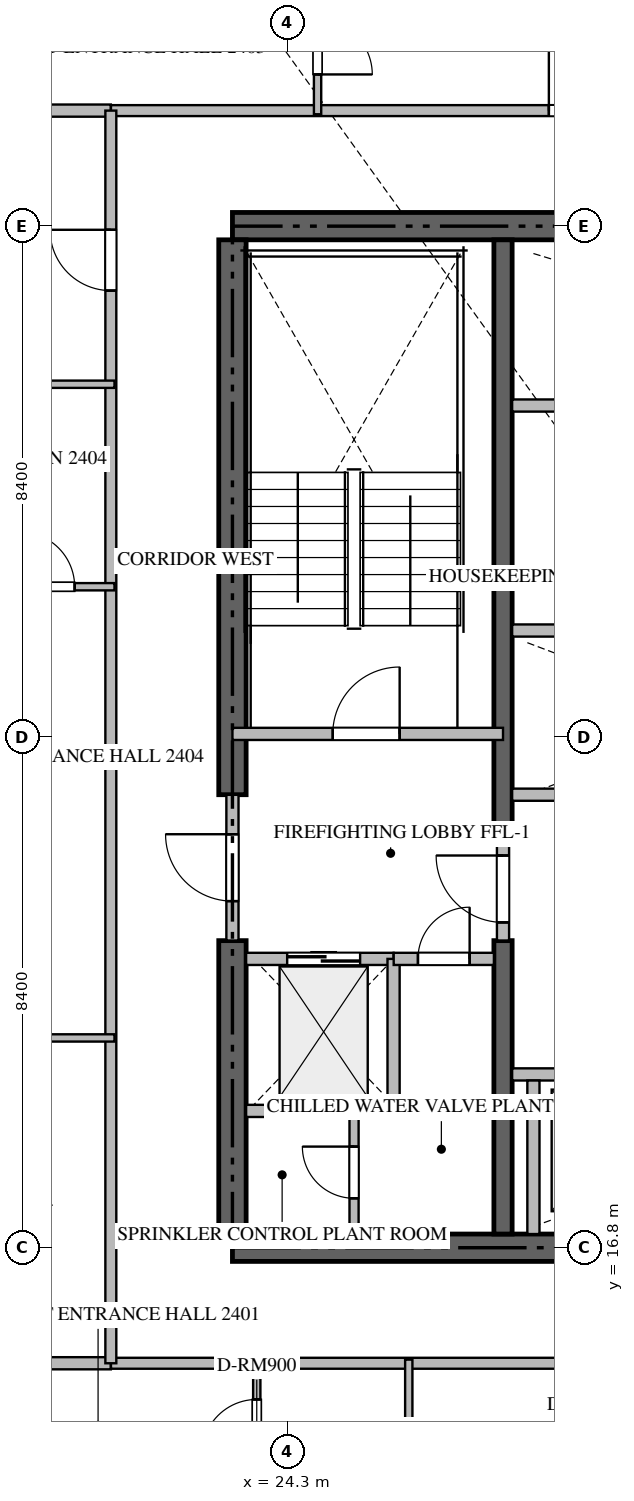
"""IFC4 building model, lengths in metres.
Left out: names, types, materials, properties, quantities, classifications, styles, units other than length and angle.
Written with IfcOpenShell. Run it as: python <this file> out.ifc"""

import sys

from ifc_helpers import new_model, si_unit, direction, frame, frame_2d, origin, place, context, subcontext, project, spatial, rectangle, extrude, source, transform, mapped, element, fill, save


model = new_model("IFC4")
c1 = context("Model", 3, precision=1e-05, world=origin(), true_north=direction((0.0, 1.0)))
c2 = subcontext(c1, "Body", "Model", "MODEL_VIEW")
j1 = project(units=[si_unit("LENGTHUNIT", "METRE"), si_unit("PLANEANGLEUNIT", "RADIAN")], contexts=[c1])
p1 = place(None, origin())
s1 = spatial("IfcSite", under=j1, at=p1, CompositionType="ELEMENT")
p2 = place(p1, origin())
s2 = spatial("IfcBuilding", under=s1, at=p2, CompositionType="ELEMENT")
p3 = place(p2, frame((0.0, 0.0, 97.95)))
s3 = spatial("IfcBuildingStorey", under=s2, at=p3, CompositionType="ELEMENT", Elevation=97.95)
for number, where, z_axis, x_axis in (
    (1, (23.4, 16.8, -0.26), (0.0, 0.0, 1.0), (1.0, 0.0, 0.0)),
    (2, (41.4, 33.6, -0.26), (0.0, 0.0, 1.0), (-1.0, 0.0, 0.0)),
):
    element("IfcWall", number, at=place(p3, frame(where, z_axis=z_axis, x_axis=x_axis)), inside=s3, PredefinedType="SHEAR", context=c2, shape_type="SweptSolid", body=[
        extrude(rectangle(XDim=18.0, YDim=0.45, at=frame_2d((9.0, 0.0))), origin(), (0.0, 0.0, 1.0), 3.748),
    ])
p4 = place(p3, frame((23.4, 17.025, -0.26), z_axis=(0.0, 0.0, 1.0), x_axis=(0.0, 1.0, 0.0)))
e3 = element("IfcWall", 3, at=p4, inside=s3, PredefinedType="SHEAR", context=c2, shape_type="SweptSolid", body=[
    extrude(rectangle(XDim=4.825, YDim=0.45, at=frame_2d((2.413, 0.0))), origin(), (0.0, 0.0, 1.0), 3.748),
])
p5 = place(p3, frame((23.4, 24.25, -0.26), z_axis=(0.0, 0.0, 1.0), x_axis=(0.0, 1.0, 0.0)))
e4 = element("IfcWall", 4, at=p5, inside=s3, PredefinedType="SHEAR", context=c2, shape_type="SweptSolid", body=[
    extrude(rectangle(XDim=9.125, YDim=0.45, at=frame_2d((4.562, 0.0))), origin(), (0.0, 0.0, 1.0), 3.748),
])
p6 = place(p3, frame((27.85, 17.025, -0.26), z_axis=(0.0, 0.0, 1.0), x_axis=(0.0, 1.0, 0.0)))
e5 = element("IfcWall", 5, at=p6, inside=s3, PredefinedType="SHEAR", context=c2, shape_type="SweptSolid", body=[
    extrude(rectangle(XDim=4.825, YDim=0.3, at=frame_2d((2.413, 0.0))), origin(), (0.0, 0.0, 1.0), 3.748),
])
p7 = place(p3, frame((27.85, 23.55, -0.26), z_axis=(0.0, 0.0, 1.0), x_axis=(0.0, 1.0, 0.0)))
e6 = element("IfcWall", 6, at=p7, inside=s3, PredefinedType="SHEAR", context=c2, shape_type="SweptSolid", body=[
    extrude(rectangle(XDim=9.825, YDim=0.3, at=frame_2d((4.913, 0.0))), origin(), (0.0, 0.0, 1.0), 3.748),
])
p8 = place(p3, frame((23.4, 25.25, 0.0), z_axis=(0.0, 0.0, 1.0), x_axis=(1.0, 0.0, 0.0)))
e7 = element("IfcWall", 7, at=p8, inside=s3, PredefinedType="STANDARD", context=c2, shape_type="SweptSolid", body=[
    extrude(rectangle(XDim=4.45, YDim=0.2, at=frame_2d((2.225, 0.0))), origin(), (0.0, 0.0, 1.0), 3.49),
])
p9 = place(p8, frame((1.65, 0.0, 0.0)))
e8 = element("IfcOpeningElement", 8, at=p9, cuts=e7, PredefinedType="OPENING", context=c2, shape_type="SweptSolid", body=[
    extrude(rectangle(XDim=1.1, YDim=2.15, at=frame_2d((0.55, 1.075))), frame((0.0, 0.11, 0.0), z_axis=(0.0, -1.0, 0.0), x_axis=(1.0, 0.0, 0.0)), (0.0, 0.0, 1.0), 0.22),
])
p10 = place(p3, frame((23.625, 21.55, 0.0), z_axis=(0.0, 0.0, 1.0), x_axis=(1.0, 0.0, 0.0)))
e9 = element("IfcWall", 9, at=p10, inside=s3, PredefinedType="STANDARD", context=c2, shape_type="SweptSolid", body=[
    extrude(rectangle(XDim=2.425, YDim=0.2, at=frame_2d((1.212, 0.0))), origin(), (0.0, 0.0, 1.0), 3.49),
])
p11 = place(p10, frame((0.675, 0.0, 0.0)))
e10 = element("IfcOpeningElement", 10, at=p11, cuts=e9, PredefinedType="OPENING", context=c2, shape_type="SweptSolid", body=[
    extrude(rectangle(XDim=1.2, YDim=2.2, at=frame_2d((0.6, 1.1))), frame((0.0, 0.11, 0.0), z_axis=(0.0, -1.0, 0.0), x_axis=(1.0, 0.0, 0.0)), (0.0, 0.0, 1.0), 0.22),
])
p12 = place(p3, frame((28.0, 19.65, 0.0), z_axis=(0.0, 0.0, 1.0), x_axis=(1.0, 0.0, 0.0)))
e11 = element("IfcWall", 11, at=p12, inside=s3, PredefinedType="STANDARD", context=c2, shape_type="SweptSolid", body=[
    extrude(rectangle(XDim=2.65, YDim=0.2, at=frame_2d((1.325, 0.0))), origin(), (0.0, 0.0, 1.0), 3.49),
])
p13 = place(p12, frame((0.9, 0.0, 0.0)))
e12 = element("IfcOpeningElement", 12, at=p13, cuts=e11, PredefinedType="OPENING", context=c2, shape_type="SweptSolid", body=[
    extrude(rectangle(XDim=1.1, YDim=2.2, at=frame_2d((0.55, 1.1))), frame((0.0, 0.11, 0.0), z_axis=(0.0, -1.0, 0.0), x_axis=(1.0, 0.0, 0.0)), (0.0, 0.0, 1.0), 0.22),
])
p14 = place(p3, frame((28.35, 17.025, 0.0), z_axis=(0.0, 0.0, 1.0), x_axis=(0.0, 1.0, 0.0)))
e13 = element("IfcWall", 13, at=p14, inside=s3, PredefinedType="STANDARD", context=c2, shape_type="SweptSolid", body=[
    extrude(rectangle(XDim=2.525, YDim=0.2, at=frame_2d((1.263, 0.0))), origin(), (0.0, 0.0, 1.0), 3.49),
])
p15 = place(p3, frame((28.0, 24.25, 0.0), z_axis=(0.0, 0.0, 1.0), x_axis=(1.0, 0.0, 0.0)))
e14 = element("IfcWall", 14, at=p15, inside=s3, PredefinedType="STANDARD", context=c2, shape_type="SweptSolid", body=[
    extrude(rectangle(XDim=2.425, YDim=0.2, at=frame_2d((1.212, 0.0))), origin(), (0.0, 0.0, 1.0), 3.49),
])
p16 = place(p3, frame((28.0, 30.65, 0.0), z_axis=(0.0, 0.0, 1.0), x_axis=(1.0, 0.0, 0.0)))
e15 = element("IfcWall", 15, at=p16, inside=s3, PredefinedType="STANDARD", context=c2, shape_type="SweptSolid", body=[
    extrude(rectangle(XDim=2.55, YDim=0.2, at=frame_2d((1.275, 0.0))), origin(), (0.0, 0.0, 1.0), 3.49),
])
p17 = place(p3, frame((26.05, 19.05, 0.0), z_axis=(0.0, 0.0, 1.0), x_axis=(0.0, 1.0, 0.0)))
e16 = element("IfcWall", 16, at=p17, inside=s3, PredefinedType="STANDARD", context=c2, shape_type="SweptSolid", body=[
    extrude(rectangle(XDim=2.5, YDim=0.2, at=frame_2d((1.25, 0.0))), origin(), (0.0, 0.0, 1.0), 3.49),
])
p18 = place(p3, frame((23.625, 19.05, 0.0), z_axis=(0.0, 0.0, 1.0), x_axis=(1.0, 0.0, 0.0)))
e17 = element("IfcWall", 17, at=p18, inside=s3, PredefinedType="STANDARD", context=c2, shape_type="SweptSolid", body=[
    extrude(rectangle(XDim=2.425, YDim=0.2, at=frame_2d((1.212, 0.0))), origin(), (0.0, 0.0, 1.0), 3.49),
])
p19 = place(p3, frame((26.052, 21.55, 0.0), z_axis=(0.0, 0.0, 1.0), x_axis=(1.0, 0.0, 0.0)))
e18 = element("IfcWall", 18, at=p19, inside=s3, PredefinedType="STANDARD", context=c2, shape_type="SweptSolid", body=[
    extrude(rectangle(XDim=1.648, YDim=0.2, at=frame_2d((0.824, 0.0))), origin(), (0.0, 0.0, 1.0), 3.49),
])
p20 = place(p19, frame((0.399, 0.0, 0.0)))
e19 = element("IfcOpeningElement", 19, at=p20, cuts=e18, PredefinedType="OPENING", context=c2, shape_type="SweptSolid", body=[
    extrude(rectangle(XDim=0.85, YDim=2.1, at=frame_2d((0.425, 1.05))), frame((0.0, 0.11, 0.0), z_axis=(0.0, -1.0, 0.0), x_axis=(1.0, 0.0, 0.0)), (0.0, 0.0, 1.0), 0.22),
])
p21 = place(p3, frame((23.4, 21.852, 0.0), z_axis=(0.0, 0.0, 1.0), x_axis=(0.0, 1.0, 0.0)))
e20 = element("IfcWall", 20, at=p21, inside=s3, PredefinedType="STANDARD", context=c2, shape_type="SweptSolid", body=[
    extrude(rectangle(XDim=2.396, YDim=0.2, at=frame_2d((1.198, 0.0))), origin(), (0.0, 0.0, 1.0), 3.49),
])
p22 = place(p21, frame((0.648, 0.0, 0.0)))
e21 = element("IfcOpeningElement", 21, at=p22, cuts=e20, PredefinedType="OPENING", context=c2, shape_type="SweptSolid", body=[
    extrude(rectangle(XDim=1.1, YDim=2.15, at=frame_2d((0.55, 1.075))), frame((0.0, 0.11, 0.0), z_axis=(0.0, -1.0, 0.0), x_axis=(1.0, 0.0, 0.0)), (0.0, 0.0, 1.0), 0.22),
])
p23 = place(p3, frame((27.85, 21.852, 0.0), z_axis=(0.0, 0.0, 1.0), x_axis=(0.0, 1.0, 0.0)))
e22 = element("IfcWall", 22, at=p23, inside=s3, PredefinedType="STANDARD", context=c2, shape_type="SweptSolid", body=[
    extrude(rectangle(XDim=1.696, YDim=0.2, at=frame_2d((0.848, 0.0))), origin(), (0.0, 0.0, 1.0), 3.49),
])
p24 = place(p23, frame((0.298, 0.0, 0.0)))
e23 = element("IfcOpeningElement", 23, at=p24, cuts=e22, PredefinedType="OPENING", context=c2, shape_type="SweptSolid", body=[
    extrude(rectangle(XDim=1.1, YDim=2.15, at=frame_2d((0.55, 1.075))), frame((0.0, 0.11, 0.0), z_axis=(0.0, -1.0, 0.0), x_axis=(1.0, 0.0, 0.0)), (0.0, 0.0, 1.0), 0.22),
])
p25 = place(p3, frame((28.0, 26.95, 0.0), z_axis=(0.0, 0.0, 1.0), x_axis=(1.0, 0.0, 0.0)))
e24 = element("IfcWall", 24, at=p25, inside=s3, PredefinedType="STANDARD", context=c2, shape_type="SweptSolid", body=[
    extrude(rectangle(XDim=6.95, YDim=0.2, at=frame_2d((3.475, 0.0))), origin(), (0.0, 0.0, 1.0), 3.49),
])
p26 = place(p3, frame((25.4, 17.025, 0.0), z_axis=(0.0, 0.0, 1.0), x_axis=(0.0, 1.0, 0.0)))
e25 = element("IfcWall", 25, at=p26, inside=s3, PredefinedType="PARTITIONING", context=c2, shape_type="SweptSolid", body=[
    extrude(rectangle(XDim=2.025, YDim=0.15, at=frame_2d((1.013, 0.0))), origin(), (0.0, 0.0, 1.0), 3.49),
])
p27 = place(p26, frame((0.588, 0.0, 0.0)))
e26 = element("IfcOpeningElement", 26, at=p27, cuts=e25, PredefinedType="OPENING", context=c2, shape_type="SweptSolid", body=[
    extrude(rectangle(XDim=0.85, YDim=2.1, at=frame_2d((0.425, 1.05))), frame((0.0, 0.085, 0.0), z_axis=(0.0, -1.0, 0.0), x_axis=(1.0, 0.0, 0.0)), (0.0, 0.0, 1.0), 0.17),
])
for number, where, z_axis, x_axis in (
    (27, (6.082, 14.9, 0.0), (0.0, 0.0, 1.0), (1.0, 0.0, 0.0)),
    (28, (6.082, 35.5, 0.0), (0.0, 0.0, 1.0), (1.0, 0.0, 0.0)),
):
    element("IfcWall", number, at=place(p3, frame(where, z_axis=z_axis, x_axis=x_axis)), inside=s3, PredefinedType="PARTITIONING", context=c2, shape_type="SweptSolid", body=[
        extrude(rectangle(XDim=15.318, YDim=0.2, at=frame_2d((7.659, 0.0))), origin(), (0.0, 0.0, 1.0), 3.49),
    ])
p28 = place(p3, frame((21.402, 14.9, 0.0), z_axis=(0.0, 0.0, 1.0), x_axis=(1.0, 0.0, 0.0)))
e29 = element("IfcWall", 29, at=p28, inside=s3, PredefinedType="PARTITIONING", context=c2, shape_type="SweptSolid", body=[
    extrude(rectangle(XDim=21.996, YDim=0.18, at=frame_2d((10.998, 0.0))), origin(), (0.0, 0.0, 1.0), 3.49),
])
p29 = place(p28, frame((7.454, 0.0, 0.0)))
e30 = element("IfcOpeningElement", 30, at=p29, cuts=e29, PredefinedType="OPENING", context=c2, shape_type="SweptSolid", body=[
    extrude(rectangle(XDim=1.0, YDim=2.15, at=frame_2d((0.5, 1.075))), frame((0.0, 0.1, 0.0), z_axis=(0.0, -1.0, 0.0), x_axis=(1.0, 0.0, 0.0)), (0.0, 0.0, 1.0), 0.2),
])
p30 = place(p28, frame((13.542, 0.0, 0.0)))
e31 = element("IfcOpeningElement", 31, at=p30, cuts=e29, PredefinedType="OPENING", context=c2, shape_type="SweptSolid", body=[
    extrude(rectangle(XDim=1.0, YDim=2.15, at=frame_2d((0.5, 1.075))), frame((0.0, 0.1, 0.0), z_axis=(0.0, -1.0, 0.0), x_axis=(1.0, 0.0, 0.0)), (0.0, 0.0, 1.0), 0.2),
])
p31 = place(p3, frame((21.402, 35.5, 0.0), z_axis=(0.0, 0.0, 1.0), x_axis=(1.0, 0.0, 0.0)))
e32 = element("IfcWall", 32, at=p31, inside=s3, PredefinedType="PARTITIONING", context=c2, shape_type="SweptSolid", body=[
    extrude(rectangle(XDim=21.996, YDim=0.18, at=frame_2d((10.998, 0.0))), origin(), (0.0, 0.0, 1.0), 3.49),
])
p32 = place(p31, frame((7.202, 0.0, 0.0)))
e33 = element("IfcOpeningElement", 33, at=p32, cuts=e32, PredefinedType="OPENING", context=c2, shape_type="SweptSolid", body=[
    extrude(rectangle(XDim=1.0, YDim=2.15, at=frame_2d((0.5, 1.075))), frame((0.0, 0.1, 0.0), z_axis=(0.0, -1.0, 0.0), x_axis=(1.0, 0.0, 0.0)), (0.0, 0.0, 1.0), 0.2),
])
p33 = place(p3, frame((21.4, 14.9, 0.0), z_axis=(0.0, 0.0, 1.0), x_axis=(0.0, 1.0, 0.0)))
e34 = element("IfcWall", 34, at=p33, inside=s3, PredefinedType="PARTITIONING", context=c2, shape_type="SweptSolid", body=[
    extrude(rectangle(XDim=20.6, YDim=0.18, at=frame_2d((10.3, 0.0))), origin(), (0.0, 0.0, 1.0), 3.49),
])
p34 = place(p33, frame((17.64, 0.0, 0.0)))
e35 = element("IfcOpeningElement", 35, at=p34, cuts=e34, PredefinedType="OPENING", context=c2, shape_type="SweptSolid", body=[
    extrude(rectangle(XDim=1.0, YDim=2.15, at=frame_2d((0.5, 1.075))), frame((0.0, 0.1, 0.0), z_axis=(0.0, -1.0, 0.0), x_axis=(1.0, 0.0, 0.0)), (0.0, 0.0, 1.0), 0.2),
])
p35 = place(p3, frame((26.3, 12.15, 0.0), z_axis=(0.0, 0.0, 1.0), x_axis=(0.0, 1.0, 0.0)))
e36 = element("IfcWall", 36, at=p35, inside=s3, PredefinedType="PARTITIONING", context=c2, shape_type="SweptSolid", body=[
    extrude(rectangle(XDim=2.81, YDim=0.12, at=frame_2d((1.405, 0.0))), origin(), (0.0, 0.0, 1.0), 3.49),
])
p36 = place(p3, frame((23.8, 12.75, 0.0), z_axis=(0.0, 0.0, 1.0), x_axis=(0.0, 1.0, 0.0)))
e37 = element("IfcWall", 37, at=p36, inside=s3, PredefinedType="PARTITIONING", context=c2, shape_type="SweptSolid", body=[
    extrude(rectangle(XDim=2.21, YDim=0.12, at=frame_2d((1.105, 0.0))), origin(), (0.0, 0.0, 1.0), 3.49),
])
p37 = place(p36, frame((0.655, 0.0, 0.0)))
e38 = element("IfcOpeningElement", 38, at=p37, cuts=e37, PredefinedType="OPENING", context=c2, shape_type="SweptSolid", body=[
    extrude(rectangle(XDim=0.9, YDim=2.1, at=frame_2d((0.45, 1.05))), frame((0.0, 0.07, 0.0), z_axis=(0.0, -1.0, 0.0), x_axis=(1.0, 0.0, 0.0)), (0.0, 0.0, 1.0), 0.14),
])
p38 = place(p3, frame((24.8, 37.65, 0.0), z_axis=(0.0, 0.0, 1.0), x_axis=(0.0, -1.0, 0.0)))
e39 = element("IfcWall", 39, at=p38, inside=s3, PredefinedType="PARTITIONING", context=c2, shape_type="SweptSolid", body=[
    extrude(rectangle(XDim=2.21, YDim=0.12, at=frame_2d((1.105, 0.0))), origin(), (0.0, 0.0, 1.0), 3.49),
])
p39 = place(p38, frame((0.655, 0.0, 0.0)))
e40 = element("IfcOpeningElement", 40, at=p39, cuts=e39, PredefinedType="OPENING", context=c2, shape_type="SweptSolid", body=[
    extrude(rectangle(XDim=0.9, YDim=2.1, at=frame_2d((0.45, 1.05))), frame((0.0, 0.07, 0.0), z_axis=(0.0, -1.0, 0.0), x_axis=(1.0, 0.0, 0.0)), (0.0, 0.0, 1.0), 0.14),
])
p40 = place(p3, frame((18.65, 31.0, 0.0), z_axis=(0.0, 0.0, 1.0), x_axis=(1.0, 0.0, 0.0)))
e41 = element("IfcWall", 41, at=p40, inside=s3, PredefinedType="PARTITIONING", context=c2, shape_type="SweptSolid", body=[
    extrude(rectangle(XDim=2.81, YDim=0.12, at=frame_2d((1.405, 0.0))), origin(), (0.0, 0.0, 1.0), 3.49),
])
p41 = place(p3, frame((19.25, 27.67, 0.0), z_axis=(0.0, 0.0, 1.0), x_axis=(1.0, 0.0, 0.0)))
e42 = element("IfcWall", 42, at=p41, inside=s3, PredefinedType="PARTITIONING", context=c2, shape_type="SweptSolid", body=[
    extrude(rectangle(XDim=2.21, YDim=0.12, at=frame_2d((1.105, 0.0))), origin(), (0.0, 0.0, 1.0), 3.49),
])
p42 = place(p41, frame((0.655, 0.0, 0.0)))
e43 = element("IfcOpeningElement", 43, at=p42, cuts=e42, PredefinedType="OPENING", context=c2, shape_type="SweptSolid", body=[
    extrude(rectangle(XDim=0.9, YDim=2.1, at=frame_2d((0.45, 1.05))), frame((0.0, 0.07, 0.0), z_axis=(0.0, -1.0, 0.0), x_axis=(1.0, 0.0, 0.0)), (0.0, 0.0, 1.0), 0.14),
])
p43 = place(p3, frame((19.252, 20.25, 0.0), z_axis=(0.0, 0.0, 1.0), x_axis=(1.0, 0.0, 0.0)))
e44 = element("IfcWall", 44, at=p43, inside=s3, PredefinedType="PARTITIONING", context=c2, shape_type="SweptSolid", body=[
    extrude(rectangle(XDim=2.208, YDim=0.12, at=frame_2d((1.104, 0.0))), origin(), (0.0, 0.0, 1.0), 3.49),
])
m1 = source(origin(), c2, "Body", "SweptSolid", [
    extrude(rectangle(XDim=1.1, YDim=2.15, at=frame_2d((0.55, 1.075))), frame((0.0, 0.025, 0.0), z_axis=(0.0, -1.0, 0.0), x_axis=(1.0, 0.0, 0.0)), (0.0, 0.0, 1.0), 0.05),
])
p44 = place(p9, origin())
e45 = element("IfcDoor", 45, at=p44, inside=s3, OperationType="SINGLE_SWING_RIGHT", PredefinedType="DOOR", context=c2, shape_type="MappedRepresentation", body=[
    mapped(m1, transform((0.0, 0.0, 0.0), scale=1.0)),
])
fill(e8, e45)
m2 = source(origin(), c2, "Body", "SweptSolid", [
    extrude(rectangle(XDim=1.2, YDim=2.2, at=frame_2d((0.6, 1.1))), frame((0.0, 0.025, 0.0), z_axis=(0.0, -1.0, 0.0), x_axis=(1.0, 0.0, 0.0)), (0.0, 0.0, 1.0), 0.05),
])
p45 = place(p11, origin())
e46 = element("IfcDoor", 46, at=p45, inside=s3, OperationType="DOUBLE_DOOR_SLIDING", PredefinedType="DOOR", context=c2, shape_type="MappedRepresentation", body=[
    mapped(m2, transform((0.0, 0.0, 0.0), scale=1.0)),
])
fill(e10, e46)
m3 = source(origin(), c2, "Body", "SweptSolid", [
    extrude(rectangle(XDim=0.85, YDim=2.1, at=frame_2d((0.425, 1.05))), frame((0.0, 0.025, 0.0), z_axis=(0.0, -1.0, 0.0), x_axis=(1.0, 0.0, 0.0)), (0.0, 0.0, 1.0), 0.05),
])
p46 = place(p20, origin())
e47 = element("IfcDoor", 47, at=p46, inside=s3, OperationType="SINGLE_SWING_RIGHT", PredefinedType="DOOR", context=c2, shape_type="MappedRepresentation", body=[
    mapped(m3, transform((0.0, 0.0, 0.0), scale=1.0)),
])
fill(e19, e47)
p47 = place(p22, origin())
e48 = element("IfcDoor", 48, at=p47, inside=s3, OperationType="SINGLE_SWING_RIGHT", PredefinedType="DOOR", context=c2, shape_type="MappedRepresentation", body=[
    mapped(m1, transform((0.0, 0.0, 0.0), scale=1.0)),
])
fill(e21, e48)
p48 = place(p24, origin())
e49 = element("IfcDoor", 49, at=p48, inside=s3, OperationType="SINGLE_SWING_RIGHT", PredefinedType="DOOR", context=c2, shape_type="MappedRepresentation", body=[
    mapped(m1, transform((0.0, 0.0, 0.0), scale=1.0)),
])
fill(e23, e49)
p49 = place(p27, origin())
e50 = element("IfcDoor", 50, at=p49, inside=s3, OperationType="SINGLE_SWING_RIGHT", PredefinedType="DOOR", context=c2, shape_type="MappedRepresentation", body=[
    mapped(m3, transform((0.0, 0.0, 0.0), scale=1.0)),
])
fill(e26, e50)
m4 = source(origin(), c2, "Body", "SweptSolid", [
    extrude(rectangle(XDim=1.0, YDim=2.15, at=frame_2d((0.5, 1.075))), frame((0.0, 0.025, 0.0), z_axis=(0.0, -1.0, 0.0), x_axis=(1.0, 0.0, 0.0)), (0.0, 0.0, 1.0), 0.05),
])
p50 = place(p32, origin())
e51 = element("IfcDoor", 51, at=p50, inside=s3, OperationType="SINGLE_SWING_LEFT", PredefinedType="DOOR", context=c2, shape_type="MappedRepresentation", body=[
    mapped(m4, transform((0.0, 0.0, 0.0), scale=1.0)),
])
fill(e33, e51)
p51 = place(p34, origin())
e52 = element("IfcDoor", 52, at=p51, inside=s3, OperationType="SINGLE_SWING_RIGHT", PredefinedType="DOOR", context=c2, shape_type="MappedRepresentation", body=[
    mapped(m4, transform((0.0, 0.0, 0.0), scale=1.0)),
])
fill(e35, e52)
m5 = source(origin(), c2, "Body", "SweptSolid", [
    extrude(rectangle(XDim=0.9, YDim=2.1, at=frame_2d((0.45, 1.05))), frame((0.0, 0.025, 0.0), z_axis=(0.0, -1.0, 0.0), x_axis=(1.0, 0.0, 0.0)), (0.0, 0.0, 1.0), 0.05),
])
p52 = place(p37, origin())
e53 = element("IfcDoor", 53, at=p52, inside=s3, OperationType="SINGLE_SWING_LEFT", PredefinedType="DOOR", context=c2, shape_type="MappedRepresentation", body=[
    mapped(m5, transform((0.0, 0.0, 0.0), scale=1.0)),
])
fill(e38, e53)
p53 = place(p39, origin())
e54 = element("IfcDoor", 54, at=p53, inside=s3, OperationType="SINGLE_SWING_RIGHT", PredefinedType="DOOR", context=c2, shape_type="MappedRepresentation", body=[
    mapped(m5, transform((0.0, 0.0, 0.0), scale=1.0)),
])
fill(e40, e54)
p54 = place(p42, origin())
e55 = element("IfcDoor", 55, at=p54, inside=s3, OperationType="SINGLE_SWING_LEFT", PredefinedType="DOOR", context=c2, shape_type="MappedRepresentation", body=[
    mapped(m5, transform((0.0, 0.0, 0.0), scale=1.0)),
])
fill(e43, e55)
save(model, sys.argv[1])
